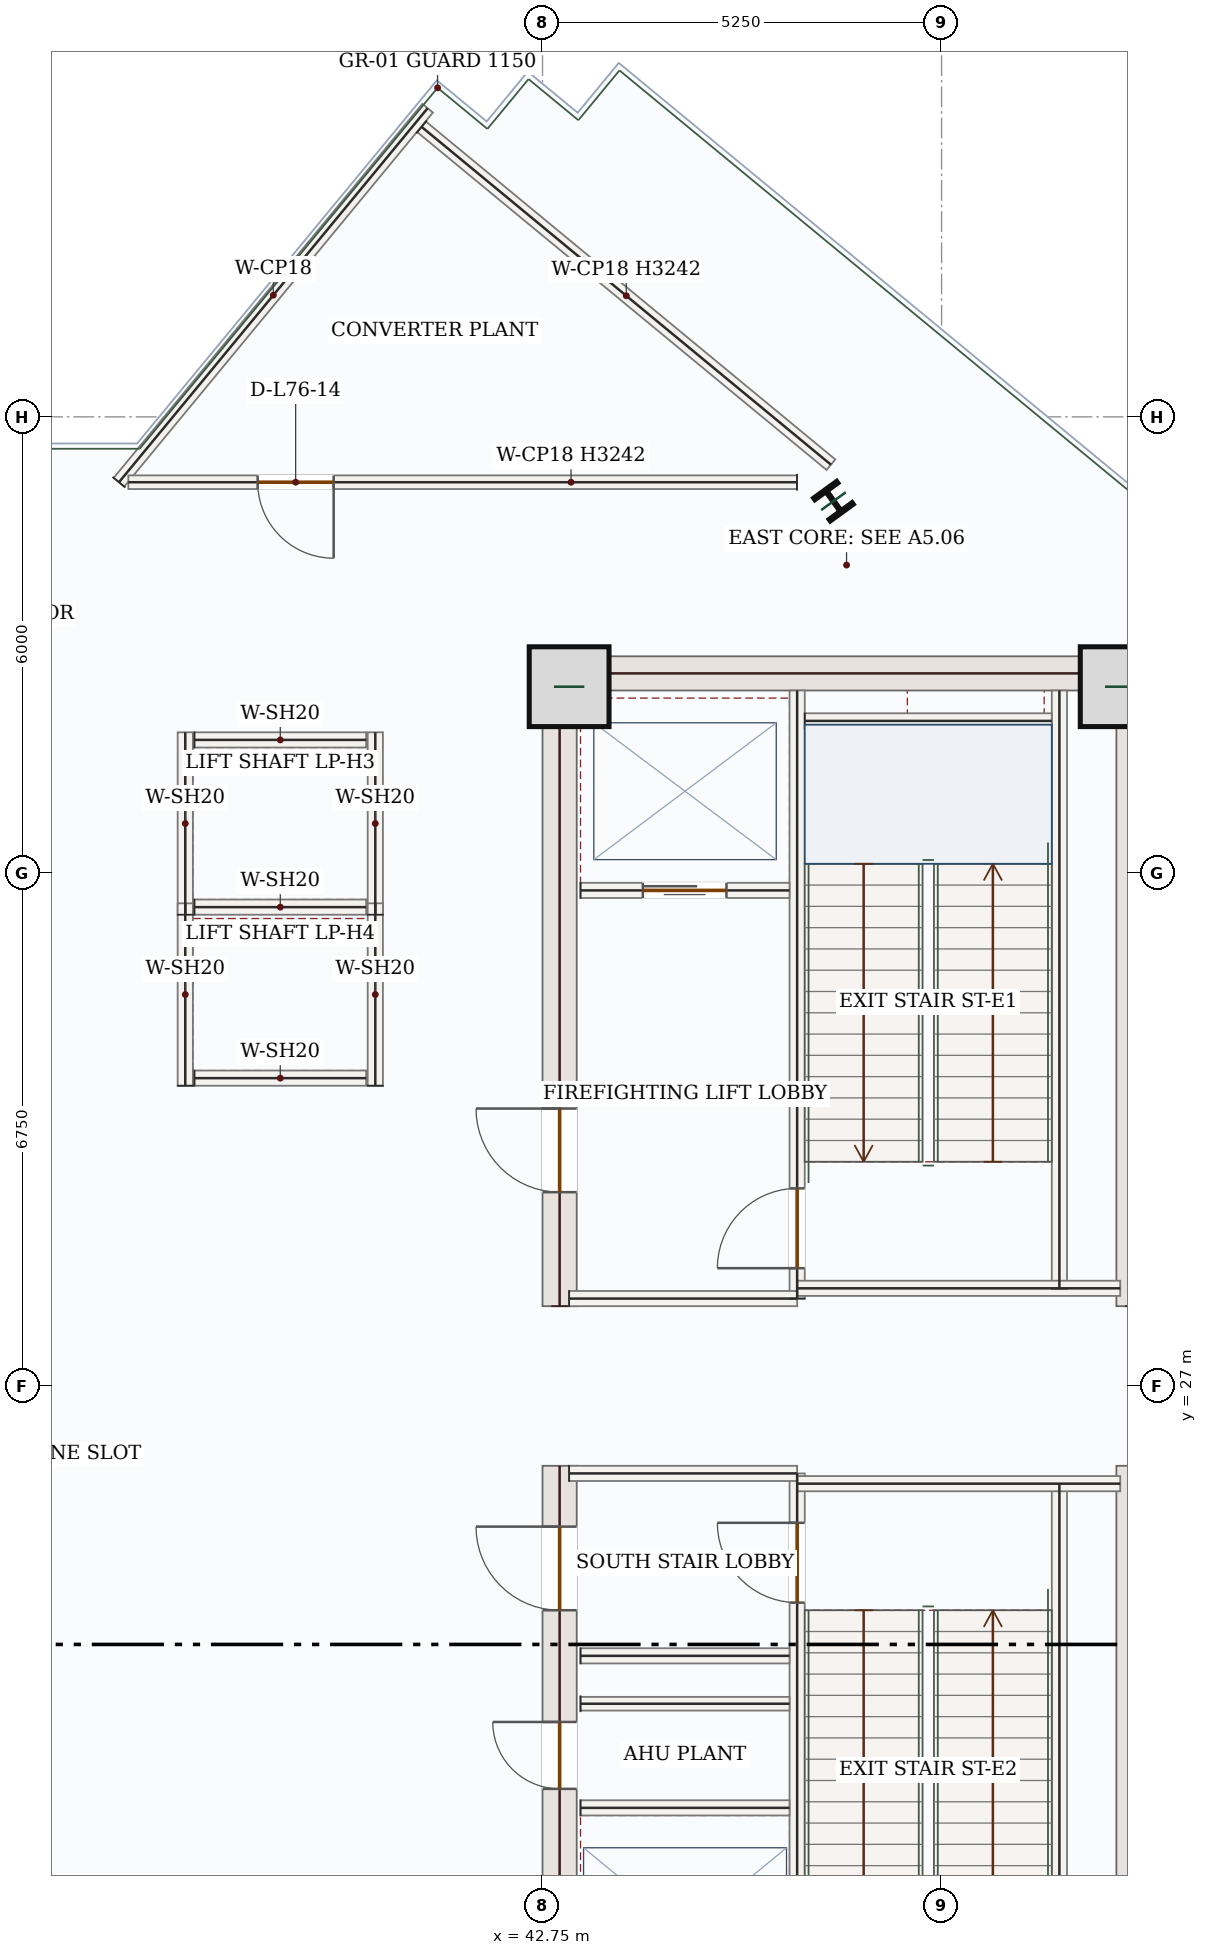
"""IFC4 building model, lengths in metres.
Left out: names, types, materials, properties, quantities, classifications, styles, units other than length and angle.
Written with IfcOpenShell. Run it as: python <this file> out.ifc"""

import sys

from ifc_helpers import new_model, si_unit, direction, frame, frame_2d, origin, origin_2d, place, context, subcontext, project, spatial, rectangle, i_section, extrude, source, transform, mapped, element, fill, save


model = new_model("IFC4")
c1 = context("Model", 3, precision=1e-05, world=origin(), true_north=direction((0.0, 1.0)))
c2 = subcontext(c1, "Body", "Model", "MODEL_VIEW")
j1 = project(units=[si_unit("LENGTHUNIT", "METRE"), si_unit("PLANEANGLEUNIT", "RADIAN")], contexts=[c1])
p1 = place(None, origin())
s1 = spatial("IfcSite", under=j1, at=p1, CompositionType="ELEMENT")
p2 = place(p1, origin())
s2 = spatial("IfcBuilding", under=s1, at=p2, CompositionType="ELEMENT")
p3 = place(p2, frame((0.0, 0.0, 314.1)))
s3 = spatial("IfcBuildingStorey", under=s2, at=p3, CompositionType="ELEMENT", Elevation=314.1)
p4 = place(p3, frame((42.975, 17.4, 0.0), z_axis=(0.0, 0.0, 1.0), x_axis=(0.0, 1.0, 0.0)))
e1 = element("IfcWall", 1, at=p4, inside=s3, PredefinedType="SHEAR", context=c2, shape_type="SweptSolid", body=[
    extrude(rectangle(XDim=8.55, YDim=0.45, at=frame_2d((4.275, 0.0))), origin(), (0.0, 0.0, 1.0), 5.45),
])
p5 = place(p4, frame((6.65, 0.0, 0.0)))
e2 = element("IfcOpeningElement", 2, at=p5, cuts=e1, PredefinedType="OPENING", context=c2, shape_type="SweptSolid", body=[
    extrude(rectangle(XDim=1.1, YDim=2.2, at=frame_2d((0.55, 1.1))), frame((0.0, 0.235, 0.0), z_axis=(0.0, -1.0, 0.0), x_axis=(1.0, 0.0, 0.0)), (0.0, 0.0, 1.0), 0.47),
])
p6 = place(p4, frame((1.75, 0.0, 0.0)))
e3 = element("IfcOpeningElement", 3, at=p6, cuts=e1, PredefinedType="OPENING", context=c2, shape_type="SweptSolid", body=[
    extrude(rectangle(XDim=1.3, YDim=2.2, at=frame_2d((0.65, 1.1))), frame((0.0, 0.235, 0.0), z_axis=(0.0, -1.0, 0.0), x_axis=(1.0, 0.0, 0.0)), (0.0, 0.0, 1.0), 0.47),
])
p7 = place(p4, frame((4.3, 0.0, 0.0)))
e4 = element("IfcOpeningElement", 4, at=p7, cuts=e1, PredefinedType="OPENING", context=c2, shape_type="SweptSolid", body=[
    extrude(rectangle(XDim=0.88, YDim=2.1, at=frame_2d((0.44, 1.05))), frame((0.0, 0.235, 0.0), z_axis=(0.0, -1.0, 0.0), x_axis=(1.0, 0.0, 0.0)), (0.0, 0.0, 1.0), 0.47),
])
p8 = place(p3, frame((42.975, 28.05, 0.0), z_axis=(0.0, 0.0, 1.0), x_axis=(0.0, 1.0, 0.0)))
e5 = element("IfcWall", 5, at=p8, inside=s3, PredefinedType="SHEAR", context=c2, shape_type="SweptSolid", body=[
    extrude(rectangle(XDim=8.55, YDim=0.45, at=frame_2d((4.275, 0.0))), origin(), (0.0, 0.0, 1.0), 5.45),
])
p9 = place(p8, frame((1.5, 0.0, 0.0)))
e6 = element("IfcOpeningElement", 6, at=p9, cuts=e5, PredefinedType="OPENING", context=c2, shape_type="SweptSolid", body=[
    extrude(rectangle(XDim=1.1, YDim=2.2, at=frame_2d((0.55, 1.1))), frame((0.0, 0.235, 0.0), z_axis=(0.0, -1.0, 0.0), x_axis=(1.0, 0.0, 0.0)), (0.0, 0.0, 1.0), 0.47),
])
m1 = source(origin(), c2, "Body", "SweptSolid", [
    extrude(rectangle(XDim=8.55, YDim=0.45, at=frame_2d((4.275, 0.0))), origin(), (0.0, 0.0, 1.0), 5.45),
])
for number, where, z_axis, x_axis in (
    (7, (50.525, 17.4, 0.0), (0.0, 0.0, 1.0), (0.0, 1.0, 0.0)),
    (8, (50.525, 28.05, 0.0), (0.0, 0.0, 1.0), (0.0, 1.0, 0.0)),
):
    element("IfcWall", number, at=place(p3, frame(where, z_axis=z_axis, x_axis=x_axis)), inside=s3, PredefinedType="SHEAR", context=c2, shape_type="MappedRepresentation", body=[
        mapped(m1, transform((0.0, 0.0, 0.0), x_axis=(1.0, 0.0, 0.0), y_axis=(0.0, 1.0, 0.0), z_axis=(0.0, 0.0, 1.0), scale=1.0)),
    ])
m2 = source(origin(), c2, "Body", "SweptSolid", [
    extrude(rectangle(XDim=7.1, YDim=0.45, at=frame_2d((3.55, 0.0))), origin(), (0.0, 0.0, 1.0), 5.45),
])
p10 = place(p3, frame((43.2, 36.375, 0.0), z_axis=(0.0, 0.0, 1.0), x_axis=(1.0, 0.0, 0.0)))
e9 = element("IfcWall", 9, at=p10, inside=s3, PredefinedType="SHEAR", context=c2, shape_type="MappedRepresentation", body=[
    mapped(m2, transform((0.0, 0.0, 0.0), x_axis=(1.0, 0.0, 0.0), y_axis=(0.0, 1.0, 0.0), z_axis=(0.0, 0.0, 1.0), scale=1.0)),
])
m3 = source(origin(), c2, "Body", "SweptSolid", [
    extrude(rectangle(XDim=1.05, YDim=1.05, at=origin_2d()), origin(), (0.0, 0.0, 1.0), 5.7),
])
for number, where, z_axis, x_axis in (
    (10, (43.1, 36.2, 0.0), (0.0, 0.0, 1.0), (1.0, 0.0, 0.0)),
    (11, (50.35, 36.2, 0.0), (0.0, 0.0, 1.0), (1.0, 0.0, 0.0)),
):
    element("IfcColumn", number, at=place(p3, frame(where, z_axis=z_axis, x_axis=x_axis)), inside=s3, PredefinedType="COLUMN", context=c2, shape_type="MappedRepresentation", body=[
        mapped(m3, transform((0.0, 0.0, 0.0), x_axis=(1.0, 0.0, 0.0), y_axis=(0.0, 1.0, 0.0), z_axis=(0.0, 0.0, 1.0), scale=1.0)),
    ])
m4 = source(origin(), c2, "Body", "SweptSolid", [
    extrude(i_section(OverallWidth=0.374, OverallDepth=0.372, WebThickness=0.016, FlangeThickness=0.026, FilletRadius=0.018, at=origin_2d()), origin(), (0.0, 0.0, 1.0), 5.7),
])
p11 = place(p3, frame((46.578, 38.641, 0.0), z_axis=(0.0, 0.0, 1.0), x_axis=(0.809016994375, 0.587785252292, 0.0)))
e12 = element("IfcColumn", 12, at=p11, inside=s3, PredefinedType="COLUMN", context=c2, shape_type="MappedRepresentation", body=[
    mapped(m4, transform((0.0, 0.0, 0.0), x_axis=(1.0, 0.0, 0.0), y_axis=(0.0, 1.0, 0.0), z_axis=(0.0, 0.0, 1.0), scale=1.0)),
])
m5 = source(origin(), c2, "Body", "SweptSolid", [
    extrude(rectangle(XDim=7.87, YDim=0.2, at=frame_2d((3.935, 0.0))), origin(), (0.0, 0.0, 1.0), 5.45),
])
for number, where, z_axis, x_axis in (
    (13, (49.55, 17.85, 0.0), (0.0, 0.0, 1.0), (0.0, 1.0, 0.0)),
    (14, (49.55, 28.28, 0.0), (0.0, 0.0, 1.0), (0.0, 1.0, 0.0)),
):
    element("IfcWall", number, at=place(p3, frame(where, z_axis=z_axis, x_axis=x_axis)), inside=s3, PredefinedType="SOLIDWALL", context=c2, shape_type="MappedRepresentation", body=[
        mapped(m5, transform((0.0, 0.0, 0.0), x_axis=(1.0, 0.0, 0.0), y_axis=(0.0, 1.0, 0.0), z_axis=(0.0, 0.0, 1.0), scale=1.0)),
    ])
p12 = place(p3, frame((46.1, 17.85, 0.0), z_axis=(0.0, 0.0, 1.0), x_axis=(0.0, 1.0, 0.0)))
e15 = element("IfcWall", 15, at=p12, inside=s3, PredefinedType="SOLIDWALL", context=c2, shape_type="SweptSolid", body=[
    extrude(rectangle(XDim=8.0, YDim=0.2, at=frame_2d((4.0, 0.0))), origin(), (0.0, 0.0, 1.0), 5.45),
])
p13 = place(p12, frame((6.3, 0.0, 0.0)))
e16 = element("IfcOpeningElement", 16, at=p13, cuts=e15, PredefinedType="OPENING", context=c2, shape_type="SweptSolid", body=[
    extrude(rectangle(XDim=1.05, YDim=2.15, at=frame_2d((0.525, 1.075))), frame((0.0, 0.11, 0.0), z_axis=(0.0, -1.0, 0.0), x_axis=(1.0, 0.0, 0.0)), (0.0, 0.0, 1.0), 0.22),
])
p14 = place(p3, frame((46.1, 28.15, 0.0), z_axis=(0.0, 0.0, 1.0), x_axis=(0.0, 1.0, 0.0)))
e17 = element("IfcWall", 17, at=p14, inside=s3, PredefinedType="SOLIDWALL", context=c2, shape_type="SweptSolid", body=[
    extrude(rectangle(XDim=8.0, YDim=0.2, at=frame_2d((4.0, 0.0))), origin(), (0.0, 0.0, 1.0), 5.45),
])
p15 = place(p14, frame((0.4, 0.0, 0.0)))
e18 = element("IfcOpeningElement", 18, at=p15, cuts=e17, PredefinedType="OPENING", context=c2, shape_type="SweptSolid", body=[
    extrude(rectangle(XDim=1.05, YDim=2.15, at=frame_2d((0.525, 1.075))), frame((0.0, 0.11, 0.0), z_axis=(0.0, -1.0, 0.0), x_axis=(1.0, 0.0, 0.0)), (0.0, 0.0, 1.0), 0.22),
])
m6 = source(origin(), c2, "Body", "SweptSolid", [
    extrude(rectangle(XDim=3.0, YDim=0.2, at=frame_2d((1.5, 0.0))), origin(), (0.0, 0.0, 1.0), 5.45),
])
p16 = place(p3, frame((43.1, 25.85, 0.0), z_axis=(0.0, 0.0, 1.0), x_axis=(1.0, 0.0, 0.0)))
e19 = element("IfcWall", 19, at=p16, inside=s3, PredefinedType="SOLIDWALL", context=c2, shape_type="MappedRepresentation", body=[
    mapped(m6, transform((0.0, 0.0, 0.0), x_axis=(1.0, 0.0, 0.0), y_axis=(0.0, 1.0, 0.0), z_axis=(0.0, 0.0, 1.0), scale=1.0)),
])
m7 = source(origin(), c2, "Body", "SweptSolid", [
    extrude(rectangle(XDim=4.25, YDim=0.2, at=frame_2d((2.125, 0.0))), origin(), (0.0, 0.0, 1.0), 5.45),
])
p17 = place(p3, frame((46.1, 25.715, 0.0), z_axis=(0.0, 0.0, 1.0), x_axis=(1.0, 0.0, 0.0)))
e20 = element("IfcWall", 20, at=p17, inside=s3, PredefinedType="SOLIDWALL", context=c2, shape_type="MappedRepresentation", body=[
    mapped(m7, transform((0.0, 0.0, 0.0), x_axis=(1.0, 0.0, 0.0), y_axis=(0.0, 1.0, 0.0), z_axis=(0.0, 0.0, 1.0), scale=1.0)),
])
p18 = place(p3, frame((43.1, 28.15, 0.0), z_axis=(0.0, 0.0, 1.0), x_axis=(1.0, 0.0, 0.0)))
e21 = element("IfcWall", 21, at=p18, inside=s3, PredefinedType="SOLIDWALL", context=c2, shape_type="MappedRepresentation", body=[
    mapped(m6, transform((0.0, 0.0, 0.0), x_axis=(1.0, 0.0, 0.0), y_axis=(0.0, 1.0, 0.0), z_axis=(0.0, 0.0, 1.0), scale=1.0)),
])
p19 = place(p3, frame((46.1, 28.285, 0.0), z_axis=(0.0, 0.0, 1.0), x_axis=(1.0, 0.0, 0.0)))
e22 = element("IfcWall", 22, at=p19, inside=s3, PredefinedType="SOLIDWALL", context=c2, shape_type="MappedRepresentation", body=[
    mapped(m7, transform((0.0, 0.0, 0.0), x_axis=(1.0, 0.0, 0.0), y_axis=(0.0, 1.0, 0.0), z_axis=(0.0, 0.0, 1.0), scale=1.0)),
])
m8 = source(origin(), c2, "Body", "SweptSolid", [
    extrude(rectangle(XDim=3.25, YDim=0.2, at=frame_2d((1.625, 0.0))), origin(), (0.0, 0.0, 1.0), 5.45),
])
p20 = place(p3, frame((46.2, 35.75, 0.0), z_axis=(0.0, 0.0, 1.0), x_axis=(1.0, 0.0, 0.0)))
e23 = element("IfcWall", 23, at=p20, inside=s3, PredefinedType="SOLIDWALL", context=c2, shape_type="MappedRepresentation", body=[
    mapped(m8, transform((0.0, 0.0, 0.0), x_axis=(1.0, 0.0, 0.0), y_axis=(0.0, 1.0, 0.0), z_axis=(0.0, 0.0, 1.0), scale=1.0)),
])
p21 = place(p3, frame((43.25, 33.52, 0.0), z_axis=(0.0, 0.0, 1.0), x_axis=(1.0, 0.0, 0.0)))
e24 = element("IfcWall", 24, at=p21, inside=s3, PredefinedType="SOLIDWALL", context=c2, shape_type="SweptSolid", body=[
    extrude(rectangle(XDim=2.75, YDim=0.2, at=frame_2d((1.375, 0.0))), origin(), (0.0, 0.0, 1.0), 5.45),
])
p22 = place(p21, frame((0.82, 0.0, 0.0)))
e25 = element("IfcOpeningElement", 25, at=p22, cuts=e24, PredefinedType="OPENING", context=c2, shape_type="SweptSolid", body=[
    extrude(rectangle(XDim=1.1, YDim=2.15, at=frame_2d((0.55, 1.075))), frame((0.0, 0.11, 0.0), z_axis=(0.0, -1.0, 0.0), x_axis=(1.0, 0.0, 0.0)), (0.0, 0.0, 1.0), 0.22),
])
m9 = source(origin(), c2, "Body", "SweptSolid", [
    extrude(rectangle(XDim=2.75, YDim=0.2, at=frame_2d((1.375, 0.0))), origin(), (0.0, 0.0, 1.0), 5.45),
])
for number, where, z_axis, x_axis in (
    (26, (43.25, 23.45, 0.0), (0.0, 0.0, 1.0), (1.0, 0.0, 0.0)),
    (27, (43.25, 21.45, 0.0), (0.0, 0.0, 1.0), (1.0, 0.0, 0.0)),
):
    element("IfcWall", number, at=place(p3, frame(where, z_axis=z_axis, x_axis=x_axis)), inside=s3, PredefinedType="SOLIDWALL", context=c2, shape_type="MappedRepresentation", body=[
        mapped(m9, transform((0.0, 0.0, 0.0), x_axis=(1.0, 0.0, 0.0), y_axis=(0.0, 1.0, 0.0), z_axis=(0.0, 0.0, 1.0), scale=1.0)),
    ])
m10 = source(origin(), c2, "Body", "SweptSolid", [
    extrude(rectangle(XDim=2.75, YDim=0.18, at=frame_2d((1.375, 0.0))), origin(), (0.0, 0.0, 1.0), 5.45),
])
p23 = place(p3, frame((43.25, 22.82, 0.0), z_axis=(0.0, 0.0, 1.0), x_axis=(1.0, 0.0, 0.0)))
e28 = element("IfcWall", 28, at=p23, inside=s3, PredefinedType="PARTITIONING", context=c2, shape_type="MappedRepresentation", body=[
    mapped(m10, transform((0.0, 0.0, 0.0), x_axis=(1.0, 0.0, 0.0), y_axis=(0.0, 1.0, 0.0), z_axis=(0.0, 0.0, 1.0), scale=1.0)),
])
m11 = source(origin(), c2, "Body", "SweptSolid", [
    extrude(rectangle(XDim=2.4, YDim=0.2, at=frame_2d((1.2, 0.0))), origin(), (0.0, 0.0, 1.0), 5.45),
])
for number, where, z_axis, x_axis in (
    (29, (38.05, 33.2, 0.0), (0.0, 0.0, 1.0), (0.0, 1.0, 0.0)),
    (30, (40.55, 33.2, 0.0), (0.0, 0.0, 1.0), (0.0, 1.0, 0.0)),
):
    element("IfcWall", number, at=place(p3, frame(where, z_axis=z_axis, x_axis=x_axis)), inside=s3, PredefinedType="SOLIDWALL", context=c2, shape_type="MappedRepresentation", body=[
        mapped(m11, transform((0.0, 0.0, 0.0), x_axis=(1.0, 0.0, 0.0), y_axis=(0.0, 1.0, 0.0), z_axis=(0.0, 0.0, 1.0), scale=1.0)),
    ])
m12 = source(origin(), c2, "Body", "SweptSolid", [
    extrude(rectangle(XDim=2.26, YDim=0.2, at=frame_2d((1.13, 0.0))), origin(), (0.0, 0.0, 1.0), 5.45),
])
for number, where, z_axis, x_axis in (
    (31, (38.17, 33.3, 0.0), (0.0, 0.0, 1.0), (1.0, 0.0, 0.0)),
    (32, (38.17, 35.5, 0.0), (0.0, 0.0, 1.0), (1.0, 0.0, 0.0)),
):
    element("IfcWall", number, at=place(p3, frame(where, z_axis=z_axis, x_axis=x_axis)), inside=s3, PredefinedType="SOLIDWALL", context=c2, shape_type="MappedRepresentation", body=[
        mapped(m12, transform((0.0, 0.0, 0.0), x_axis=(1.0, 0.0, 0.0), y_axis=(0.0, 1.0, 0.0), z_axis=(0.0, 0.0, 1.0), scale=1.0)),
    ])
for number, where, z_axis, x_axis in (
    (33, (38.05, 30.95, 0.0), (0.0, 0.0, 1.0), (0.0, 1.0, 0.0)),
    (34, (40.55, 30.95, 0.0), (0.0, 0.0, 1.0), (0.0, 1.0, 0.0)),
):
    element("IfcWall", number, at=place(p3, frame(where, z_axis=z_axis, x_axis=x_axis)), inside=s3, PredefinedType="SOLIDWALL", context=c2, shape_type="MappedRepresentation", body=[
        mapped(m11, transform((0.0, 0.0, 0.0), x_axis=(1.0, 0.0, 0.0), y_axis=(0.0, 1.0, 0.0), z_axis=(0.0, 0.0, 1.0), scale=1.0)),
    ])
p24 = place(p3, frame((38.17, 31.05, 0.0), z_axis=(0.0, 0.0, 1.0), x_axis=(1.0, 0.0, 0.0)))
e35 = element("IfcWall", 35, at=p24, inside=s3, PredefinedType="SOLIDWALL", context=c2, shape_type="MappedRepresentation", body=[
    mapped(m12, transform((0.0, 0.0, 0.0), x_axis=(1.0, 0.0, 0.0), y_axis=(0.0, 1.0, 0.0), z_axis=(0.0, 0.0, 1.0), scale=1.0)),
])
m13 = source(origin(), c2, "Body", "SweptSolid", [
    extrude(rectangle(XDim=6.38, YDim=0.18, at=frame_2d((3.19, 0.0))), origin(), (0.0, 0.0, 1.0), 5.45),
])
p25 = place(p3, frame((37.178, 38.89, 0.0), z_axis=(0.0, 0.0, 1.0), x_axis=(0.636503619764, 0.771273714078, 0.0)))
e36 = element("IfcWall", 36, at=p25, inside=s3, PredefinedType="PARTITIONING", context=c2, shape_type="MappedRepresentation", body=[
    mapped(m13, transform((0.0, 0.0, 0.0), x_axis=(1.0, 0.0, 0.0), y_axis=(0.0, 1.0, 0.0), z_axis=(0.0, 0.0, 1.0), scale=1.0)),
])
m14 = source(origin(), c2, "Body", "SweptSolid", [
    extrude(rectangle(XDim=6.982, YDim=0.18, at=frame_2d((3.491, 0.0))), origin(), (0.0, 0.0, 1.0), 3.242),
])
p26 = place(p3, frame((41.159, 43.565, 0.0), z_axis=(0.0, 0.0, 1.0), x_axis=(0.7712505433, -0.636531695565, 0.0)))
e37 = element("IfcWall", 37, at=p26, inside=s3, PredefinedType="PARTITIONING", context=c2, shape_type="MappedRepresentation", body=[
    mapped(m14, transform((0.0, 0.0, 0.0), x_axis=(1.0, 0.0, 0.0), y_axis=(0.0, 1.0, 0.0), z_axis=(0.0, 0.0, 1.0), scale=1.0)),
])
p27 = place(p3, frame((46.098, 38.89, 0.0), z_axis=(0.0, 0.0, 1.0), x_axis=(-1.0, 0.0, 0.0)))
e38 = element("IfcWall", 38, at=p27, inside=s3, PredefinedType="PARTITIONING", context=c2, shape_type="SweptSolid", body=[
    extrude(rectangle(XDim=8.797, YDim=0.18, at=frame_2d((4.398, 0.0))), origin(), (0.0, 0.0, 1.0), 3.242),
])
p28 = place(p27, frame((6.096, 0.0, 0.0)))
e39 = element("IfcOpeningElement", 39, at=p28, cuts=e38, PredefinedType="OPENING", context=c2, shape_type="SweptSolid", body=[
    extrude(rectangle(XDim=1.0, YDim=2.15, at=frame_2d((0.5, 1.075))), frame((0.0, 0.1, 0.0), z_axis=(0.0, -1.0, 0.0), x_axis=(1.0, 0.0, 0.0)), (0.0, 0.0, 1.0), 0.2),
])
m15 = source(origin(), c2, "Body", "SweptSolid", [
    extrude(rectangle(XDim=1.05, YDim=2.15, at=frame_2d((0.525, 1.075))), frame((0.0, 0.025, 0.0), z_axis=(0.0, -1.0, 0.0), x_axis=(1.0, 0.0, 0.0)), (0.0, 0.0, 1.0), 0.05),
])
p29 = place(p15, origin())
e40 = element("IfcDoor", 40, at=p29, inside=s3, OperationType="SINGLE_SWING_LEFT", PredefinedType="DOOR", context=c2, shape_type="MappedRepresentation", body=[
    mapped(m15, transform((0.0, 0.0, 0.0), x_axis=(1.0, 0.0, 0.0), y_axis=(0.0, 1.0, 0.0), z_axis=(0.0, 0.0, 1.0), scale=1.0)),
])
fill(e18, e40)
p30 = place(p13, origin())
e41 = element("IfcDoor", 41, at=p30, inside=s3, OperationType="SINGLE_SWING_RIGHT", PredefinedType="DOOR", context=c2, shape_type="MappedRepresentation", body=[
    mapped(m15, transform((0.0, 0.0, 0.0), x_axis=(1.0, 0.0, 0.0), y_axis=(0.0, 1.0, 0.0), z_axis=(0.0, 0.0, 1.0), scale=1.0)),
])
fill(e16, e41)
m16 = source(origin(), c2, "Body", "SweptSolid", [
    extrude(rectangle(XDim=1.1, YDim=2.15, at=frame_2d((0.55, 1.075))), frame((0.0, 0.025, 0.0), z_axis=(0.0, -1.0, 0.0), x_axis=(1.0, 0.0, 0.0)), (0.0, 0.0, 1.0), 0.05),
])
p31 = place(p22, origin())
e42 = element("IfcDoor", 42, at=p31, inside=s3, OperationType="DOUBLE_DOOR_SLIDING", PredefinedType="DOOR", context=c2, shape_type="MappedRepresentation", body=[
    mapped(m16, transform((0.0, 0.0, 0.0), x_axis=(1.0, 0.0, 0.0), y_axis=(0.0, 1.0, 0.0), z_axis=(0.0, 0.0, 1.0), scale=1.0)),
])
fill(e25, e42)
m17 = source(origin(), c2, "Body", "SweptSolid", [
    extrude(rectangle(XDim=1.1, YDim=2.2, at=frame_2d((0.55, 1.1))), frame((0.0, 0.025, 0.0), z_axis=(0.0, -1.0, 0.0), x_axis=(1.0, 0.0, 0.0)), (0.0, 0.0, 1.0), 0.05),
])
p32 = place(p9, origin())
e43 = element("IfcDoor", 43, at=p32, inside=s3, OperationType="SINGLE_SWING_RIGHT", PredefinedType="DOOR", context=c2, shape_type="MappedRepresentation", body=[
    mapped(m17, transform((0.0, 0.0, 0.0), x_axis=(1.0, 0.0, 0.0), y_axis=(0.0, 1.0, 0.0), z_axis=(0.0, 0.0, 1.0), scale=1.0)),
])
fill(e6, e43)
p33 = place(p5, origin())
e44 = element("IfcDoor", 44, at=p33, inside=s3, OperationType="SINGLE_SWING_RIGHT", PredefinedType="DOOR", context=c2, shape_type="MappedRepresentation", body=[
    mapped(m17, transform((0.0, 0.0, 0.0), x_axis=(1.0, 0.0, 0.0), y_axis=(0.0, 1.0, 0.0), z_axis=(0.0, 0.0, 1.0), scale=1.0)),
])
fill(e2, e44)
m18 = source(origin(), c2, "Body", "SweptSolid", [
    extrude(rectangle(XDim=0.88, YDim=2.1, at=frame_2d((0.44, 1.05))), frame((0.0, 0.025, 0.0), z_axis=(0.0, -1.0, 0.0), x_axis=(1.0, 0.0, 0.0)), (0.0, 0.0, 1.0), 0.05),
])
p34 = place(p7, origin())
e45 = element("IfcDoor", 45, at=p34, inside=s3, OperationType="SINGLE_SWING_RIGHT", PredefinedType="DOOR", context=c2, shape_type="MappedRepresentation", body=[
    mapped(m18, transform((0.0, 0.0, 0.0), x_axis=(1.0, 0.0, 0.0), y_axis=(0.0, 1.0, 0.0), z_axis=(0.0, 0.0, 1.0), scale=1.0)),
])
fill(e4, e45)
m19 = source(origin(), c2, "Body", "SweptSolid", [
    extrude(rectangle(XDim=1.0, YDim=2.15, at=frame_2d((0.5, 1.075))), frame((0.0, 0.025, 0.0), z_axis=(0.0, -1.0, 0.0), x_axis=(1.0, 0.0, 0.0)), (0.0, 0.0, 1.0), 0.05),
])
p35 = place(p28, origin())
e46 = element("IfcDoor", 46, at=p35, inside=s3, OperationType="SINGLE_SWING_LEFT", PredefinedType="DOOR", context=c2, shape_type="MappedRepresentation", body=[
    mapped(m19, transform((0.0, 0.0, 0.0), x_axis=(1.0, 0.0, 0.0), y_axis=(0.0, 1.0, 0.0), z_axis=(0.0, 0.0, 1.0), scale=1.0)),
])
fill(e39, e46)
save(model, sys.argv[1])
